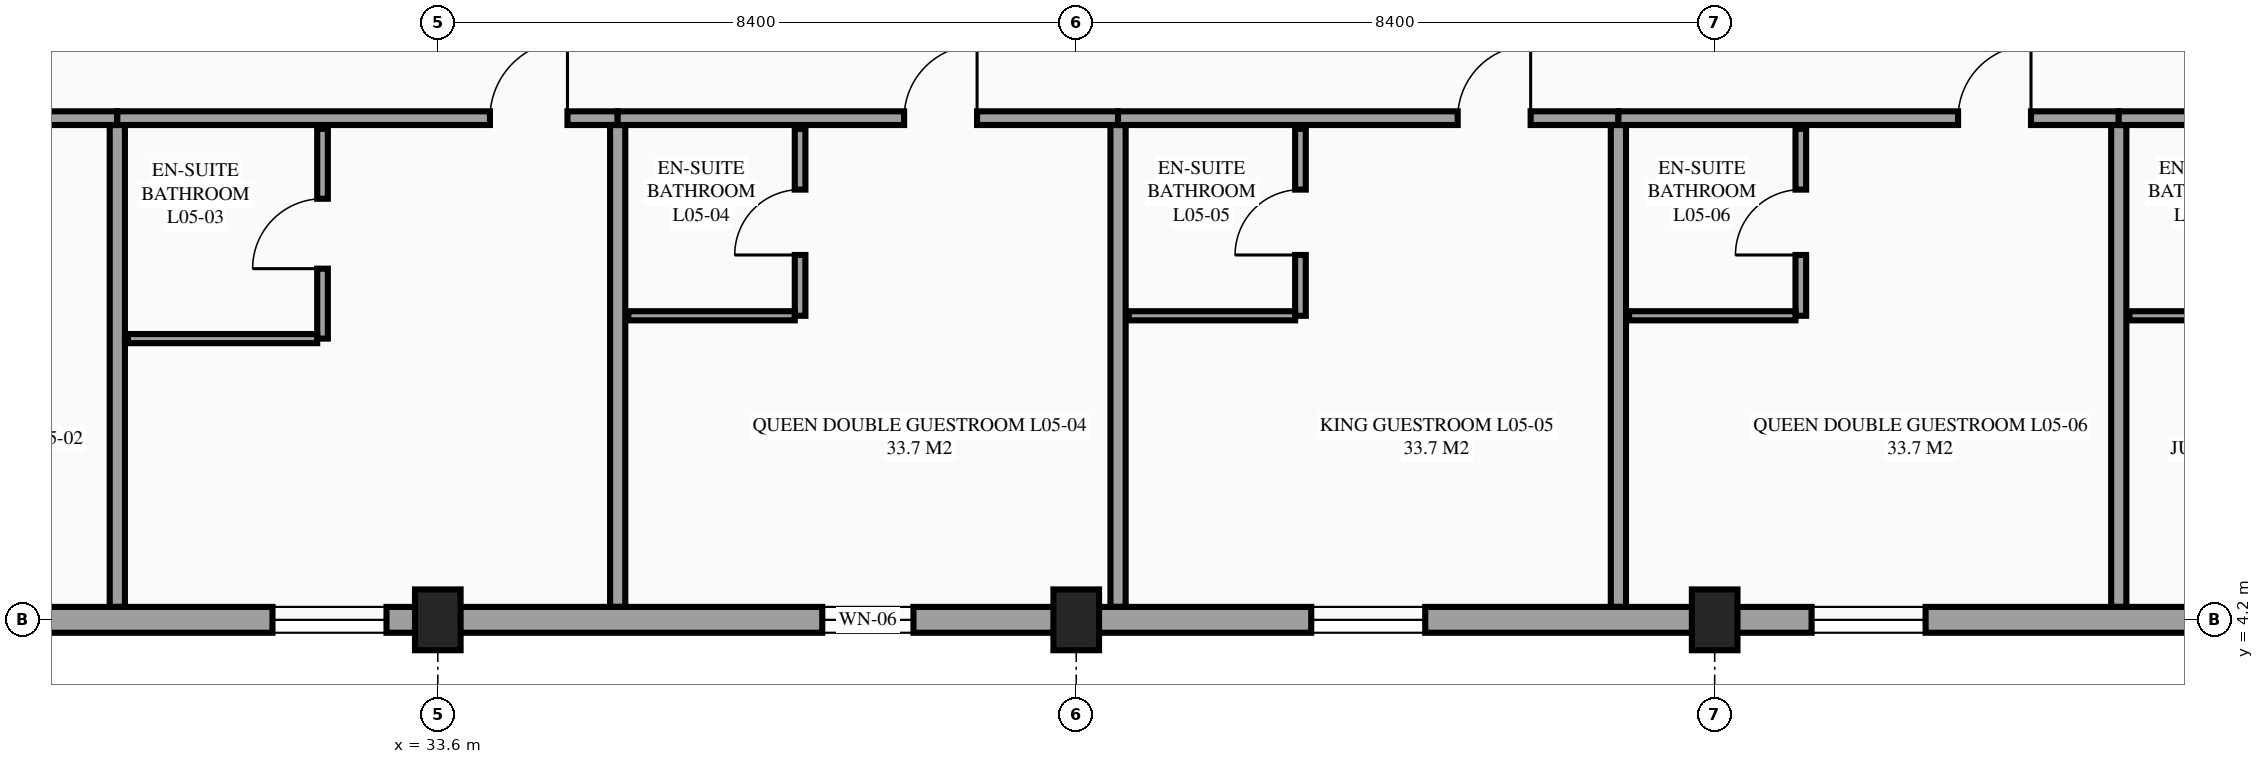
"""IFC4 building model, lengths in metres.
Left out: names, types, materials, properties, quantities, classifications, styles, units other than length and angle.
Written with IfcOpenShell. Run it as: python <this file> out.ifc"""

import sys

from ifc_helpers import new_model, si_unit, direction, frame, frame_2d, origin, origin_2d, place, context, subcontext, project, spatial, rectangle, extrude, element, fill, save


model = new_model("IFC4")
c1 = context("Model", 3, precision=1e-05, world=origin(), true_north=direction((0.0, 1.0)))
c2 = subcontext(c1, "Body", "Model", "MODEL_VIEW")
j1 = project(units=[si_unit("LENGTHUNIT", "METRE"), si_unit("PLANEANGLEUNIT", "RADIAN")], contexts=[c1])
p1 = place(None, origin())
s1 = spatial("IfcSite", under=j1, at=p1, CompositionType="ELEMENT")
p2 = place(p1, origin())
s2 = spatial("IfcBuilding", under=s1, at=p2, CompositionType="ELEMENT")
p3 = place(p2, frame((0.0, 0.0, 21.9)))
s3 = spatial("IfcBuildingStorey", under=s2, at=p3, CompositionType="ELEMENT", Elevation=21.9)
for number, where, z_axis, x_axis in (
    (1, (33.6, 4.2, 0.0), (0.0, 0.0, 1.0), (1.0, 0.0, 0.0)),
    (2, (42.0, 4.2, 0.0), (0.0, 0.0, 1.0), (1.0, 0.0, 0.0)),
    (3, (50.4, 4.2, 0.0), (0.0, 0.0, 1.0), (1.0, 0.0, 0.0)),
):
    element("IfcColumn", number, at=place(p3, frame(where, z_axis=z_axis, x_axis=x_axis)), inside=s3, PredefinedType="COLUMN", context=c2, shape_type="SweptSolid", body=[
        extrude(rectangle(XDim=0.6, YDim=0.8, at=origin_2d()), origin(), (0.0, 0.0, 1.0), 3.6),
    ])
p4 = place(p3, frame((22.8, 10.8, 0.0), z_axis=(0.0, 0.0, 1.0), x_axis=(1.0, 0.0, 0.0)))
e4 = element("IfcWall", 4, at=p4, inside=s3, PredefinedType="PARTITIONING", context=c2, shape_type="SweptSolid", body=[
    extrude(rectangle(XDim=6.583, YDim=0.18, at=frame_2d((3.292, 0.0))), origin(), (0.0, 0.0, 1.0), 3.375),
])
p5 = place(p4, frame((4.552, 0.0, 0.0)))
e5 = element("IfcOpeningElement", 5, at=p5, cuts=e4, PredefinedType="OPENING", context=c2, shape_type="SweptSolid", body=[
    extrude(rectangle(XDim=1.02, YDim=2.15, at=frame_2d((0.51, 1.075))), frame((0.0, 0.1, 0.0), z_axis=(0.0, -1.0, 0.0), x_axis=(1.0, 0.0, 0.0)), (0.0, 0.0, 1.0), 0.2),
])
p6 = place(p3, frame((29.383, 4.37, 0.0), z_axis=(0.0, 0.0, 1.0), x_axis=(0.0, 1.0, 0.0)))
e6 = element("IfcWall", 6, at=p6, inside=s3, PredefinedType="PARTITIONING", context=c2, shape_type="SweptSolid", body=[
    extrude(rectangle(XDim=6.34, YDim=0.2, at=frame_2d((3.17, 0.0))), origin(), (0.0, 0.0, 1.0), 3.375),
])
p7 = place(p3, frame((29.383, 10.8, 0.0), z_axis=(0.0, 0.0, 1.0), x_axis=(1.0, 0.0, 0.0)))
e7 = element("IfcWall", 7, at=p7, inside=s3, PredefinedType="PARTITIONING", context=c2, shape_type="SweptSolid", body=[
    extrude(rectangle(XDim=6.583, YDim=0.18, at=frame_2d((3.292, 0.0))), origin(), (0.0, 0.0, 1.0), 3.375),
])
p8 = place(p7, frame((4.903, 0.0, 0.0)))
e8 = element("IfcOpeningElement", 8, at=p8, cuts=e7, PredefinedType="OPENING", context=c2, shape_type="SweptSolid", body=[
    extrude(rectangle(XDim=1.02, YDim=2.15, at=frame_2d((0.51, 1.075))), frame((0.0, 0.1, 0.0), z_axis=(0.0, -1.0, 0.0), x_axis=(1.0, 0.0, 0.0)), (0.0, 0.0, 1.0), 0.2),
])
p9 = place(p3, frame((35.967, 4.37, 0.0), z_axis=(0.0, 0.0, 1.0), x_axis=(0.0, 1.0, 0.0)))
e9 = element("IfcWall", 9, at=p9, inside=s3, PredefinedType="PARTITIONING", context=c2, shape_type="SweptSolid", body=[
    extrude(rectangle(XDim=6.34, YDim=0.2, at=frame_2d((3.17, 0.0))), origin(), (0.0, 0.0, 1.0), 3.375),
])
p10 = place(p3, frame((32.083, 7.9, 0.0), z_axis=(0.0, 0.0, 1.0), x_axis=(0.0, 1.0, 0.0)))
e10 = element("IfcWall", 10, at=p10, inside=s3, PredefinedType="PARTITIONING", context=c2, shape_type="SweptSolid", body=[
    extrude(rectangle(XDim=2.76, YDim=0.14, at=frame_2d((1.38, 0.0))), origin(), (0.0, 0.0, 1.0), 3.375),
])
p11 = place(p10, frame((0.92, 0.0, 0.0)))
e11 = element("IfcOpeningElement", 11, at=p11, cuts=e10, PredefinedType="OPENING", context=c2, shape_type="SweptSolid", body=[
    extrude(rectangle(XDim=0.92, YDim=2.1, at=frame_2d((0.46, 1.05))), frame((0.0, 0.08, 0.0), z_axis=(0.0, -1.0, 0.0), x_axis=(1.0, 0.0, 0.0)), (0.0, 0.0, 1.0), 0.16),
])
p12 = place(p3, frame((29.523, 7.9, 0.0), z_axis=(0.0, 0.0, 1.0), x_axis=(1.0, 0.0, 0.0)))
e12 = element("IfcWall", 12, at=p12, inside=s3, PredefinedType="PARTITIONING", context=c2, shape_type="SweptSolid", body=[
    extrude(rectangle(XDim=2.49, YDim=0.12, at=frame_2d((1.245, 0.0))), origin(), (0.0, 0.0, 1.0), 3.375),
])
p13 = place(p3, frame((35.967, 10.8, 0.0), z_axis=(0.0, 0.0, 1.0), x_axis=(1.0, 0.0, 0.0)))
e13 = element("IfcWall", 13, at=p13, inside=s3, PredefinedType="PARTITIONING", context=c2, shape_type="SweptSolid", body=[
    extrude(rectangle(XDim=6.583, YDim=0.18, at=frame_2d((3.292, 0.0))), origin(), (0.0, 0.0, 1.0), 3.375),
])
p14 = place(p13, frame((3.769, 0.0, 0.0)))
e14 = element("IfcOpeningElement", 14, at=p14, cuts=e13, PredefinedType="OPENING", context=c2, shape_type="SweptSolid", body=[
    extrude(rectangle(XDim=0.96, YDim=2.15, at=frame_2d((0.48, 1.075))), frame((0.0, 0.1, 0.0), z_axis=(0.0, -1.0, 0.0), x_axis=(1.0, 0.0, 0.0)), (0.0, 0.0, 1.0), 0.2),
])
p15 = place(p3, frame((42.55, 4.37, 0.0), z_axis=(0.0, 0.0, 1.0), x_axis=(0.0, 1.0, 0.0)))
e15 = element("IfcWall", 15, at=p15, inside=s3, PredefinedType="PARTITIONING", context=c2, shape_type="SweptSolid", body=[
    extrude(rectangle(XDim=6.34, YDim=0.2, at=frame_2d((3.17, 0.0))), origin(), (0.0, 0.0, 1.0), 3.375),
])
p16 = place(p3, frame((38.367, 8.2, 0.0), z_axis=(0.0, 0.0, 1.0), x_axis=(0.0, 1.0, 0.0)))
e16 = element("IfcWall", 16, at=p16, inside=s3, PredefinedType="PARTITIONING", context=c2, shape_type="SweptSolid", body=[
    extrude(rectangle(XDim=2.46, YDim=0.14, at=frame_2d((1.23, 0.0))), origin(), (0.0, 0.0, 1.0), 3.375),
])
p17 = place(p16, frame((0.8, 0.0, 0.0)))
e17 = element("IfcOpeningElement", 17, at=p17, cuts=e16, PredefinedType="OPENING", context=c2, shape_type="SweptSolid", body=[
    extrude(rectangle(XDim=0.86, YDim=2.1, at=frame_2d((0.43, 1.05))), frame((0.0, 0.08, 0.0), z_axis=(0.0, -1.0, 0.0), x_axis=(1.0, 0.0, 0.0)), (0.0, 0.0, 1.0), 0.16),
])
p18 = place(p3, frame((36.107, 8.2, 0.0), z_axis=(0.0, 0.0, 1.0), x_axis=(1.0, 0.0, 0.0)))
e18 = element("IfcWall", 18, at=p18, inside=s3, PredefinedType="PARTITIONING", context=c2, shape_type="SweptSolid", body=[
    extrude(rectangle(XDim=2.19, YDim=0.12, at=frame_2d((1.095, 0.0))), origin(), (0.0, 0.0, 1.0), 3.375),
])
p19 = place(p3, frame((42.55, 10.8, 0.0), z_axis=(0.0, 0.0, 1.0), x_axis=(1.0, 0.0, 0.0)))
e19 = element("IfcWall", 19, at=p19, inside=s3, PredefinedType="PARTITIONING", context=c2, shape_type="SweptSolid", body=[
    extrude(rectangle(XDim=6.583, YDim=0.18, at=frame_2d((3.292, 0.0))), origin(), (0.0, 0.0, 1.0), 3.375),
])
p20 = place(p19, frame((4.469, 0.0, 0.0)))
e20 = element("IfcOpeningElement", 20, at=p20, cuts=e19, PredefinedType="OPENING", context=c2, shape_type="SweptSolid", body=[
    extrude(rectangle(XDim=0.96, YDim=2.15, at=frame_2d((0.48, 1.075))), frame((0.0, 0.1, 0.0), z_axis=(0.0, -1.0, 0.0), x_axis=(1.0, 0.0, 0.0)), (0.0, 0.0, 1.0), 0.2),
])
p21 = place(p3, frame((49.133, 4.37, 0.0), z_axis=(0.0, 0.0, 1.0), x_axis=(0.0, 1.0, 0.0)))
e21 = element("IfcWall", 21, at=p21, inside=s3, PredefinedType="PARTITIONING", context=c2, shape_type="SweptSolid", body=[
    extrude(rectangle(XDim=6.34, YDim=0.2, at=frame_2d((3.17, 0.0))), origin(), (0.0, 0.0, 1.0), 3.375),
])
p22 = place(p3, frame((44.95, 8.2, 0.0), z_axis=(0.0, 0.0, 1.0), x_axis=(0.0, 1.0, 0.0)))
e22 = element("IfcWall", 22, at=p22, inside=s3, PredefinedType="PARTITIONING", context=c2, shape_type="SweptSolid", body=[
    extrude(rectangle(XDim=2.46, YDim=0.14, at=frame_2d((1.23, 0.0))), origin(), (0.0, 0.0, 1.0), 3.375),
])
p23 = place(p22, frame((0.8, 0.0, 0.0)))
e23 = element("IfcOpeningElement", 23, at=p23, cuts=e22, PredefinedType="OPENING", context=c2, shape_type="SweptSolid", body=[
    extrude(rectangle(XDim=0.86, YDim=2.1, at=frame_2d((0.43, 1.05))), frame((0.0, 0.08, 0.0), z_axis=(0.0, -1.0, 0.0), x_axis=(1.0, 0.0, 0.0)), (0.0, 0.0, 1.0), 0.16),
])
p24 = place(p3, frame((42.69, 8.2, 0.0), z_axis=(0.0, 0.0, 1.0), x_axis=(1.0, 0.0, 0.0)))
e24 = element("IfcWall", 24, at=p24, inside=s3, PredefinedType="PARTITIONING", context=c2, shape_type="SweptSolid", body=[
    extrude(rectangle(XDim=2.19, YDim=0.12, at=frame_2d((1.095, 0.0))), origin(), (0.0, 0.0, 1.0), 3.375),
])
p25 = place(p3, frame((49.133, 10.8, 0.0), z_axis=(0.0, 0.0, 1.0), x_axis=(1.0, 0.0, 0.0)))
e25 = element("IfcWall", 25, at=p25, inside=s3, PredefinedType="PARTITIONING", context=c2, shape_type="SweptSolid", body=[
    extrude(rectangle(XDim=6.583, YDim=0.18, at=frame_2d((3.292, 0.0))), origin(), (0.0, 0.0, 1.0), 3.375),
])
p26 = place(p25, frame((4.469, 0.0, 0.0)))
e26 = element("IfcOpeningElement", 26, at=p26, cuts=e25, PredefinedType="OPENING", context=c2, shape_type="SweptSolid", body=[
    extrude(rectangle(XDim=0.96, YDim=2.15, at=frame_2d((0.48, 1.075))), frame((0.0, 0.1, 0.0), z_axis=(0.0, -1.0, 0.0), x_axis=(1.0, 0.0, 0.0)), (0.0, 0.0, 1.0), 0.2),
])
p27 = place(p3, frame((55.717, 4.37, 0.0), z_axis=(0.0, 0.0, 1.0), x_axis=(0.0, 1.0, 0.0)))
e27 = element("IfcWall", 27, at=p27, inside=s3, PredefinedType="PARTITIONING", context=c2, shape_type="SweptSolid", body=[
    extrude(rectangle(XDim=6.34, YDim=0.2, at=frame_2d((3.17, 0.0))), origin(), (0.0, 0.0, 1.0), 3.375),
])
p28 = place(p3, frame((51.533, 8.2, 0.0), z_axis=(0.0, 0.0, 1.0), x_axis=(0.0, 1.0, 0.0)))
e28 = element("IfcWall", 28, at=p28, inside=s3, PredefinedType="PARTITIONING", context=c2, shape_type="SweptSolid", body=[
    extrude(rectangle(XDim=2.46, YDim=0.14, at=frame_2d((1.23, 0.0))), origin(), (0.0, 0.0, 1.0), 3.375),
])
p29 = place(p28, frame((0.8, 0.0, 0.0)))
e29 = element("IfcOpeningElement", 29, at=p29, cuts=e28, PredefinedType="OPENING", context=c2, shape_type="SweptSolid", body=[
    extrude(rectangle(XDim=0.86, YDim=2.1, at=frame_2d((0.43, 1.05))), frame((0.0, 0.08, 0.0), z_axis=(0.0, -1.0, 0.0), x_axis=(1.0, 0.0, 0.0)), (0.0, 0.0, 1.0), 0.16),
])
p30 = place(p3, frame((49.273, 8.2, 0.0), z_axis=(0.0, 0.0, 1.0), x_axis=(1.0, 0.0, 0.0)))
e30 = element("IfcWall", 30, at=p30, inside=s3, PredefinedType="PARTITIONING", context=c2, shape_type="SweptSolid", body=[
    extrude(rectangle(XDim=2.19, YDim=0.12, at=frame_2d((1.095, 0.0))), origin(), (0.0, 0.0, 1.0), 3.375),
])
p31 = place(p3, frame((55.717, 10.8, 0.0), z_axis=(0.0, 0.0, 1.0), x_axis=(1.0, 0.0, 0.0)))
e31 = element("IfcWall", 31, at=p31, inside=s3, PredefinedType="PARTITIONING", context=c2, shape_type="SweptSolid", body=[
    extrude(rectangle(XDim=6.583, YDim=0.18, at=frame_2d((3.292, 0.0))), origin(), (0.0, 0.0, 1.0), 3.375),
])
p32 = place(p31, frame((4.469, 0.0, 0.0)))
e32 = element("IfcOpeningElement", 32, at=p32, cuts=e31, PredefinedType="OPENING", context=c2, shape_type="SweptSolid", body=[
    extrude(rectangle(XDim=0.96, YDim=2.15, at=frame_2d((0.48, 1.075))), frame((0.0, 0.1, 0.0), z_axis=(0.0, -1.0, 0.0), x_axis=(1.0, 0.0, 0.0)), (0.0, 0.0, 1.0), 0.2),
])
p33 = place(p3, frame((55.857, 8.2, 0.0), z_axis=(0.0, 0.0, 1.0), x_axis=(1.0, 0.0, 0.0)))
e33 = element("IfcWall", 33, at=p33, inside=s3, PredefinedType="PARTITIONING", context=c2, shape_type="SweptSolid", body=[
    extrude(rectangle(XDim=2.19, YDim=0.12, at=frame_2d((1.095, 0.0))), origin(), (0.0, 0.0, 1.0), 3.375),
])
p34 = place(p3, frame((22.6, 4.2, 0.0), z_axis=(0.0, 0.0, 1.0), x_axis=(1.0, 0.0, 0.0)))
e34 = element("IfcWall", 34, at=p34, inside=s3, PredefinedType="STANDARD", context=c2, shape_type="SweptSolid", body=[
    extrude(rectangle(XDim=11.0, YDim=0.34, at=frame_2d((5.5, 0.0))), origin(), (0.0, 0.0, 1.0), 2.63),
])
p35 = place(p34, frame((3.242, 0.0, 0.85)))
e35 = element("IfcOpeningElement", 35, at=p35, cuts=e34, PredefinedType="OPENING", context=c2, shape_type="SweptSolid", body=[
    extrude(rectangle(XDim=1.5, YDim=1.5, at=frame_2d((0.75, 0.75))), frame((0.0, 0.18, 0.0), z_axis=(0.0, -1.0, 0.0), x_axis=(1.0, 0.0, 0.0)), (0.0, 0.0, 1.0), 0.36),
])
p36 = place(p34, frame((8.825, 0.0, 0.85)))
e36 = element("IfcOpeningElement", 36, at=p36, cuts=e34, PredefinedType="OPENING", context=c2, shape_type="SweptSolid", body=[
    extrude(rectangle(XDim=1.5, YDim=1.5, at=frame_2d((0.75, 0.75))), frame((0.0, 0.18, 0.0), z_axis=(0.0, -1.0, 0.0), x_axis=(1.0, 0.0, 0.0)), (0.0, 0.0, 1.0), 0.36),
])
p37 = place(p3, frame((33.6, 4.2, 0.0), z_axis=(0.0, 0.0, 1.0), x_axis=(1.0, 0.0, 0.0)))
e37 = element("IfcWall", 37, at=p37, inside=s3, PredefinedType="STANDARD", context=c2, shape_type="SweptSolid", body=[
    extrude(rectangle(XDim=8.4, YDim=0.34, at=frame_2d((4.2, 0.0))), origin(), (0.0, 0.0, 1.0), 3.075),
])
p38 = place(p37, frame((5.058, 0.0, 0.85)))
e38 = element("IfcOpeningElement", 38, at=p38, cuts=e37, PredefinedType="OPENING", context=c2, shape_type="SweptSolid", body=[
    extrude(rectangle(XDim=1.2, YDim=1.5, at=frame_2d((0.6, 0.75))), frame((0.0, 0.18, 0.0), z_axis=(0.0, -1.0, 0.0), x_axis=(1.0, 0.0, 0.0)), (0.0, 0.0, 1.0), 0.36),
])
p39 = place(p3, frame((42.0, 4.2, 0.0), z_axis=(0.0, 0.0, 1.0), x_axis=(1.0, 0.0, 0.0)))
e39 = element("IfcWall", 39, at=p39, inside=s3, PredefinedType="STANDARD", context=c2, shape_type="SweptSolid", body=[
    extrude(rectangle(XDim=8.4, YDim=0.34, at=frame_2d((4.2, 0.0))), origin(), (0.0, 0.0, 1.0), 2.78),
])
p40 = place(p39, frame((3.092, 0.0, 0.85)))
e40 = element("IfcOpeningElement", 40, at=p40, cuts=e39, PredefinedType="OPENING", context=c2, shape_type="SweptSolid", body=[
    extrude(rectangle(XDim=1.5, YDim=1.5, at=frame_2d((0.75, 0.75))), frame((0.0, 0.18, 0.0), z_axis=(0.0, -1.0, 0.0), x_axis=(1.0, 0.0, 0.0)), (0.0, 0.0, 1.0), 0.36),
])
p41 = place(p3, frame((50.4, 4.2, 0.0), z_axis=(0.0, 0.0, 1.0), x_axis=(1.0, 0.0, 0.0)))
e41 = element("IfcWall", 41, at=p41, inside=s3, PredefinedType="STANDARD", context=c2, shape_type="SweptSolid", body=[
    extrude(rectangle(XDim=8.4, YDim=0.34, at=frame_2d((4.2, 0.0))), origin(), (0.0, 0.0, 1.0), 2.43),
])
p42 = place(p41, frame((1.275, 0.0, 0.85)))
e42 = element("IfcOpeningElement", 42, at=p42, cuts=e41, PredefinedType="OPENING", context=c2, shape_type="SweptSolid", body=[
    extrude(rectangle(XDim=1.5, YDim=1.5, at=frame_2d((0.75, 0.75))), frame((0.0, 0.18, 0.0), z_axis=(0.0, -1.0, 0.0), x_axis=(1.0, 0.0, 0.0)), (0.0, 0.0, 1.0), 0.36),
])
p43 = place(p36, origin())
e43 = element("IfcWindow", 43, at=p43, inside=s3, PartitioningType="SINGLE_PANEL", PredefinedType="WINDOW", context=c2, shape_type="SweptSolid", body=[
    extrude(rectangle(XDim=1.5, YDim=1.5, at=frame_2d((0.75, 0.75))), frame((0.0, 0.03, 0.0), z_axis=(0.0, -1.0, 0.0), x_axis=(1.0, 0.0, 0.0)), (0.0, 0.0, 1.0), 0.06),
])
fill(e36, e43)
p44 = place(p38, origin())
e44 = element("IfcWindow", 44, at=p44, inside=s3, PartitioningType="SINGLE_PANEL", PredefinedType="WINDOW", context=c2, shape_type="SweptSolid", body=[
    extrude(rectangle(XDim=1.2, YDim=1.5, at=frame_2d((0.6, 0.75))), frame((0.0, 0.03, 0.0), z_axis=(0.0, -1.0, 0.0), x_axis=(1.0, 0.0, 0.0)), (0.0, 0.0, 1.0), 0.06),
])
fill(e38, e44)
p45 = place(p40, origin())
e45 = element("IfcWindow", 45, at=p45, inside=s3, PartitioningType="SINGLE_PANEL", PredefinedType="WINDOW", context=c2, shape_type="SweptSolid", body=[
    extrude(rectangle(XDim=1.5, YDim=1.5, at=frame_2d((0.75, 0.75))), frame((0.0, 0.03, 0.0), z_axis=(0.0, -1.0, 0.0), x_axis=(1.0, 0.0, 0.0)), (0.0, 0.0, 1.0), 0.06),
])
fill(e40, e45)
p46 = place(p42, origin())
e46 = element("IfcWindow", 46, at=p46, inside=s3, PartitioningType="SINGLE_PANEL", PredefinedType="WINDOW", context=c2, shape_type="SweptSolid", body=[
    extrude(rectangle(XDim=1.5, YDim=1.5, at=frame_2d((0.75, 0.75))), frame((0.0, 0.03, 0.0), z_axis=(0.0, -1.0, 0.0), x_axis=(1.0, 0.0, 0.0)), (0.0, 0.0, 1.0), 0.06),
])
fill(e42, e46)
p47 = place(p8, origin())
e47 = element("IfcDoor", 47, at=p47, inside=s3, OperationType="SINGLE_SWING_RIGHT", PredefinedType="DOOR", context=c2, shape_type="SweptSolid", body=[
    extrude(rectangle(XDim=1.02, YDim=2.15, at=frame_2d((0.51, 1.075))), frame((0.0, 0.025, 0.0), z_axis=(0.0, -1.0, 0.0), x_axis=(1.0, 0.0, 0.0)), (0.0, 0.0, 1.0), 0.05),
])
fill(e8, e47)
p48 = place(p11, origin())
e48 = element("IfcDoor", 48, at=p48, inside=s3, OperationType="SINGLE_SWING_LEFT", PredefinedType="DOOR", context=c2, shape_type="SweptSolid", body=[
    extrude(rectangle(XDim=0.92, YDim=2.1, at=frame_2d((0.46, 1.05))), frame((0.0, 0.025, 0.0), z_axis=(0.0, -1.0, 0.0), x_axis=(1.0, 0.0, 0.0)), (0.0, 0.0, 1.0), 0.05),
])
fill(e11, e48)
p49 = place(p14, origin())
e49 = element("IfcDoor", 49, at=p49, inside=s3, OperationType="SINGLE_SWING_RIGHT", PredefinedType="DOOR", context=c2, shape_type="SweptSolid", body=[
    extrude(rectangle(XDim=0.96, YDim=2.15, at=frame_2d((0.48, 1.075))), frame((0.0, 0.025, 0.0), z_axis=(0.0, -1.0, 0.0), x_axis=(1.0, 0.0, 0.0)), (0.0, 0.0, 1.0), 0.05),
])
fill(e14, e49)
p50 = place(p17, origin())
e50 = element("IfcDoor", 50, at=p50, inside=s3, OperationType="SINGLE_SWING_LEFT", PredefinedType="DOOR", context=c2, shape_type="SweptSolid", body=[
    extrude(rectangle(XDim=0.86, YDim=2.1, at=frame_2d((0.43, 1.05))), frame((0.0, 0.025, 0.0), z_axis=(0.0, -1.0, 0.0), x_axis=(1.0, 0.0, 0.0)), (0.0, 0.0, 1.0), 0.05),
])
fill(e17, e50)
p51 = place(p20, origin())
e51 = element("IfcDoor", 51, at=p51, inside=s3, OperationType="SINGLE_SWING_RIGHT", PredefinedType="DOOR", context=c2, shape_type="SweptSolid", body=[
    extrude(rectangle(XDim=0.96, YDim=2.15, at=frame_2d((0.48, 1.075))), frame((0.0, 0.025, 0.0), z_axis=(0.0, -1.0, 0.0), x_axis=(1.0, 0.0, 0.0)), (0.0, 0.0, 1.0), 0.05),
])
fill(e20, e51)
p52 = place(p23, origin())
e52 = element("IfcDoor", 52, at=p52, inside=s3, OperationType="SINGLE_SWING_LEFT", PredefinedType="DOOR", context=c2, shape_type="SweptSolid", body=[
    extrude(rectangle(XDim=0.86, YDim=2.1, at=frame_2d((0.43, 1.05))), frame((0.0, 0.025, 0.0), z_axis=(0.0, -1.0, 0.0), x_axis=(1.0, 0.0, 0.0)), (0.0, 0.0, 1.0), 0.05),
])
fill(e23, e52)
p53 = place(p26, origin())
e53 = element("IfcDoor", 53, at=p53, inside=s3, OperationType="SINGLE_SWING_RIGHT", PredefinedType="DOOR", context=c2, shape_type="SweptSolid", body=[
    extrude(rectangle(XDim=0.96, YDim=2.15, at=frame_2d((0.48, 1.075))), frame((0.0, 0.025, 0.0), z_axis=(0.0, -1.0, 0.0), x_axis=(1.0, 0.0, 0.0)), (0.0, 0.0, 1.0), 0.05),
])
fill(e26, e53)
p54 = place(p29, origin())
e54 = element("IfcDoor", 54, at=p54, inside=s3, OperationType="SINGLE_SWING_LEFT", PredefinedType="DOOR", context=c2, shape_type="SweptSolid", body=[
    extrude(rectangle(XDim=0.86, YDim=2.1, at=frame_2d((0.43, 1.05))), frame((0.0, 0.025, 0.0), z_axis=(0.0, -1.0, 0.0), x_axis=(1.0, 0.0, 0.0)), (0.0, 0.0, 1.0), 0.05),
])
fill(e29, e54)
save(model, sys.argv[1])
